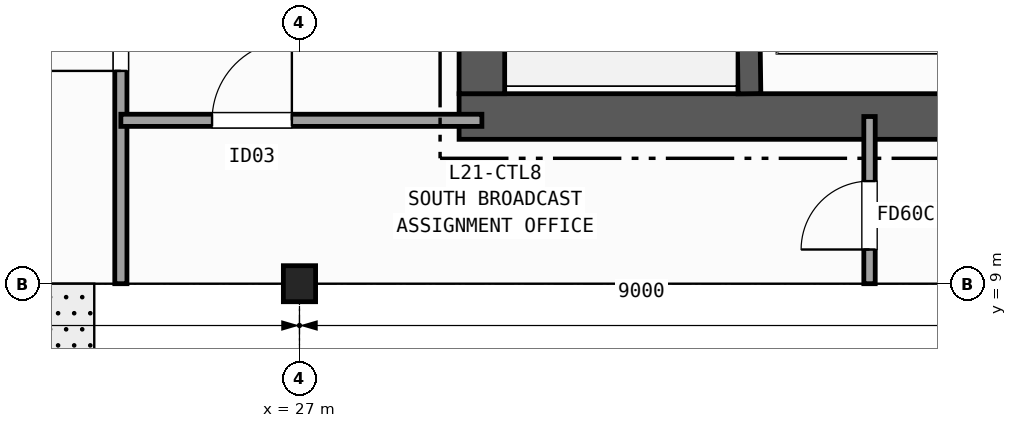
"""IFC4 building model, lengths in metres.
Left out: names, types, materials, properties, quantities, classifications, styles, units other than length and angle.
Written with IfcOpenShell. Run it as: python <this file> out.ifc"""

import sys

from ifc_helpers import new_model, si_unit, direction, frame, frame_2d, origin, origin_2d, place, context, subcontext, project, spatial, rectangle, i_section, extrude, element, fill, save


model = new_model("IFC4")
c1 = context("Model", 3, precision=1e-05, world=origin(), true_north=direction((0.0, 1.0)))
c2 = subcontext(c1, "Body", "Model", "MODEL_VIEW")
j1 = project(units=[si_unit("LENGTHUNIT", "METRE"), si_unit("PLANEANGLEUNIT", "RADIAN")], contexts=[c1])
p1 = place(None, origin())
s1 = spatial("IfcSite", under=j1, at=p1, CompositionType="ELEMENT")
p2 = place(p1, origin())
s2 = spatial("IfcBuilding", under=s1, at=p2, CompositionType="ELEMENT")
p3 = place(p2, frame((0.0, 0.0, 89.1)))
s3 = spatial("IfcBuildingStorey", under=s2, at=p3, CompositionType="ELEMENT", Elevation=89.1)
p4 = place(p3, frame((27.0, 9.0, 0.0), z_axis=(0.0, 0.0, 1.0), x_axis=(1.0, 0.0, 0.0)))
e1 = element("IfcColumn", 1, at=p4, inside=s3, PredefinedType="COLUMN", context=c2, shape_type="SweptSolid", body=[
    extrude(i_section(OverallWidth=0.424, OverallDepth=0.474, WebThickness=0.048, FlangeThickness=0.077, FilletRadius=0.015, at=origin_2d()), origin(), (0.0, 0.0, 1.0), 3.7),
])
p5 = place(p3, frame((29.1, 11.2, 0.0), z_axis=(0.0, 0.0, 1.0), x_axis=(1.0, 0.0, 0.0)))
e2 = element("IfcWall", 2, at=p5, inside=s3, PredefinedType="SHEAR", context=c2, shape_type="SweptSolid", body=[
    extrude(rectangle(XDim=14.0, YDim=0.6, at=frame_2d((7.0, 0.0))), origin(), (0.0, 0.0, 1.0), 3.42),
])
p6 = place(p3, frame((29.4, 24.3, 0.0), z_axis=(0.0, 0.0, 1.0), x_axis=(0.0, -1.0, 0.0)))
e3 = element("IfcWall", 3, at=p6, inside=s3, PredefinedType="SHEAR", context=c2, shape_type="SweptSolid", body=[
    extrude(rectangle(XDim=12.8, YDim=0.6, at=frame_2d((6.4, 0.0))), origin(), (0.0, 0.0, 1.0), 3.42),
])
p7 = place(p6, frame((1.4, 0.0, 0.0)))
e4 = element("IfcOpeningElement", 4, at=p7, cuts=e3, PredefinedType="OPENING", context=c2, shape_type="SweptSolid", body=[
    extrude(rectangle(XDim=1.35, YDim=2.15, at=frame_2d((0.675, 1.075))), frame((0.0, 0.31, 0.0), z_axis=(0.0, -1.0, 0.0), x_axis=(1.0, 0.0, 0.0)), (0.0, 0.0, 1.0), 0.62),
])
p8 = place(p3, frame((32.92, 11.5, 0.0), z_axis=(0.0, 0.0, 1.0), x_axis=(-0.013244407292, 0.999912288991, 0.0)))
e5 = element("IfcWall", 5, at=p8, inside=s3, PredefinedType="SHEAR", context=c2, shape_type="SweptSolid", body=[
    extrude(rectangle(XDim=9.051, YDim=0.3, at=frame_2d((4.525, 0.0))), origin(), (0.0, 0.0, 1.0), 3.42),
])
p9 = place(p3, frame((24.65, 9.0, 0.0), z_axis=(0.0, 0.0, 1.0), x_axis=(0.0, 1.0, 0.0)))
e6 = element("IfcWall", 6, at=p9, inside=s3, PredefinedType="PARTITIONING", context=c2, shape_type="SweptSolid", body=[
    extrude(rectangle(XDim=19.2, YDim=0.16, at=frame_2d((9.6, 0.0))), origin(), (0.0, 0.0, 1.0), 2.627),
])
p10 = place(p9, frame((2.8, 0.0, 0.0)))
e7 = element("IfcOpeningElement", 7, at=p10, cuts=e6, PredefinedType="OPENING", context=c2, shape_type="SweptSolid", body=[
    extrude(rectangle(XDim=1.0, YDim=2.1, at=frame_2d((0.5, 1.05))), frame((0.0, 0.09, 0.0), z_axis=(0.0, -1.0, 0.0), x_axis=(1.0, 0.0, 0.0)), (0.0, 0.0, 1.0), 0.18),
])
p11 = place(p9, frame((8.95, 0.0, 0.0)))
e8 = element("IfcOpeningElement", 8, at=p11, cuts=e6, PredefinedType="OPENING", context=c2, shape_type="SweptSolid", body=[
    extrude(rectangle(XDim=1.05, YDim=2.15, at=frame_2d((0.525, 1.075))), frame((0.0, 0.09, 0.0), z_axis=(0.0, -1.0, 0.0), x_axis=(1.0, 0.0, 0.0)), (0.0, 0.0, 1.0), 0.18),
])
p12 = place(p9, frame((13.44, 0.0, 0.0)))
e9 = element("IfcOpeningElement", 9, at=p12, cuts=e6, PredefinedType="OPENING", context=c2, shape_type="SweptSolid", body=[
    extrude(rectangle(XDim=1.2, YDim=2.15, at=frame_2d((0.6, 1.075))), frame((0.0, 0.09, 0.0), z_axis=(0.0, -1.0, 0.0), x_axis=(1.0, 0.0, 0.0)), (0.0, 0.0, 1.0), 0.18),
])
p13 = place(p3, frame((24.65, 11.15, 0.0), z_axis=(0.0, 0.0, 1.0), x_axis=(1.0, 0.0, 0.0)))
e10 = element("IfcWall", 10, at=p13, inside=s3, PredefinedType="PARTITIONING", context=c2, shape_type="SweptSolid", body=[
    extrude(rectangle(XDim=4.75, YDim=0.16, at=frame_2d((2.375, 0.0))), origin(), (0.0, 0.0, 1.0), 2.792),
])
p14 = place(p13, frame((1.2, 0.0, 0.0)))
e11 = element("IfcOpeningElement", 11, at=p14, cuts=e10, PredefinedType="OPENING", context=c2, shape_type="SweptSolid", body=[
    extrude(rectangle(XDim=1.05, YDim=2.15, at=frame_2d((0.525, 1.075))), frame((0.0, 0.09, 0.0), z_axis=(0.0, -1.0, 0.0), x_axis=(1.0, 0.0, 0.0)), (0.0, 0.0, 1.0), 0.18),
])
p15 = place(p3, frame((34.5, 9.0, 0.0), z_axis=(0.0, 0.0, 1.0), x_axis=(0.0, 1.0, 0.0)))
e12 = element("IfcWall", 12, at=p15, inside=s3, PredefinedType="PARTITIONING", context=c2, shape_type="SweptSolid", body=[
    extrude(rectangle(XDim=2.2, YDim=0.15, at=frame_2d((1.1, 0.0))), origin(), (0.0, 0.0, 1.0), 2.627),
])
p16 = place(p15, frame((0.45, 0.0, 0.0)))
e13 = element("IfcOpeningElement", 13, at=p16, cuts=e12, PredefinedType="OPENING", context=c2, shape_type="SweptSolid", body=[
    extrude(rectangle(XDim=0.9, YDim=2.1, at=frame_2d((0.45, 1.05))), frame((0.0, 0.085, 0.0), z_axis=(0.0, -1.0, 0.0), x_axis=(1.0, 0.0, 0.0)), (0.0, 0.0, 1.0), 0.17),
])
p17 = place(p10, origin())
e14 = element("IfcDoor", 14, at=p17, inside=s3, OperationType="SINGLE_SWING_LEFT", PredefinedType="DOOR", context=c2, shape_type="SweptSolid", body=[
    extrude(rectangle(XDim=1.0, YDim=2.1, at=frame_2d((0.5, 1.05))), frame((0.0, 0.025, 0.0), z_axis=(0.0, -1.0, 0.0), x_axis=(1.0, 0.0, 0.0)), (0.0, 0.0, 1.0), 0.05),
])
fill(e7, e14)
p18 = place(p14, origin())
e15 = element("IfcDoor", 15, at=p18, inside=s3, OperationType="SINGLE_SWING_RIGHT", PredefinedType="DOOR", context=c2, shape_type="SweptSolid", body=[
    extrude(rectangle(XDim=1.05, YDim=2.15, at=frame_2d((0.525, 1.075))), frame((0.0, 0.025, 0.0), z_axis=(0.0, -1.0, 0.0), x_axis=(1.0, 0.0, 0.0)), (0.0, 0.0, 1.0), 0.05),
])
fill(e11, e15)
p19 = place(p16, origin())
e16 = element("IfcDoor", 16, at=p19, inside=s3, OperationType="SINGLE_SWING_LEFT", PredefinedType="DOOR", context=c2, shape_type="SweptSolid", body=[
    extrude(rectangle(XDim=0.9, YDim=2.1, at=frame_2d((0.45, 1.05))), frame((0.0, 0.025, 0.0), z_axis=(0.0, -1.0, 0.0), x_axis=(1.0, 0.0, 0.0)), (0.0, 0.0, 1.0), 0.05),
])
fill(e13, e16)
save(model, sys.argv[1])
